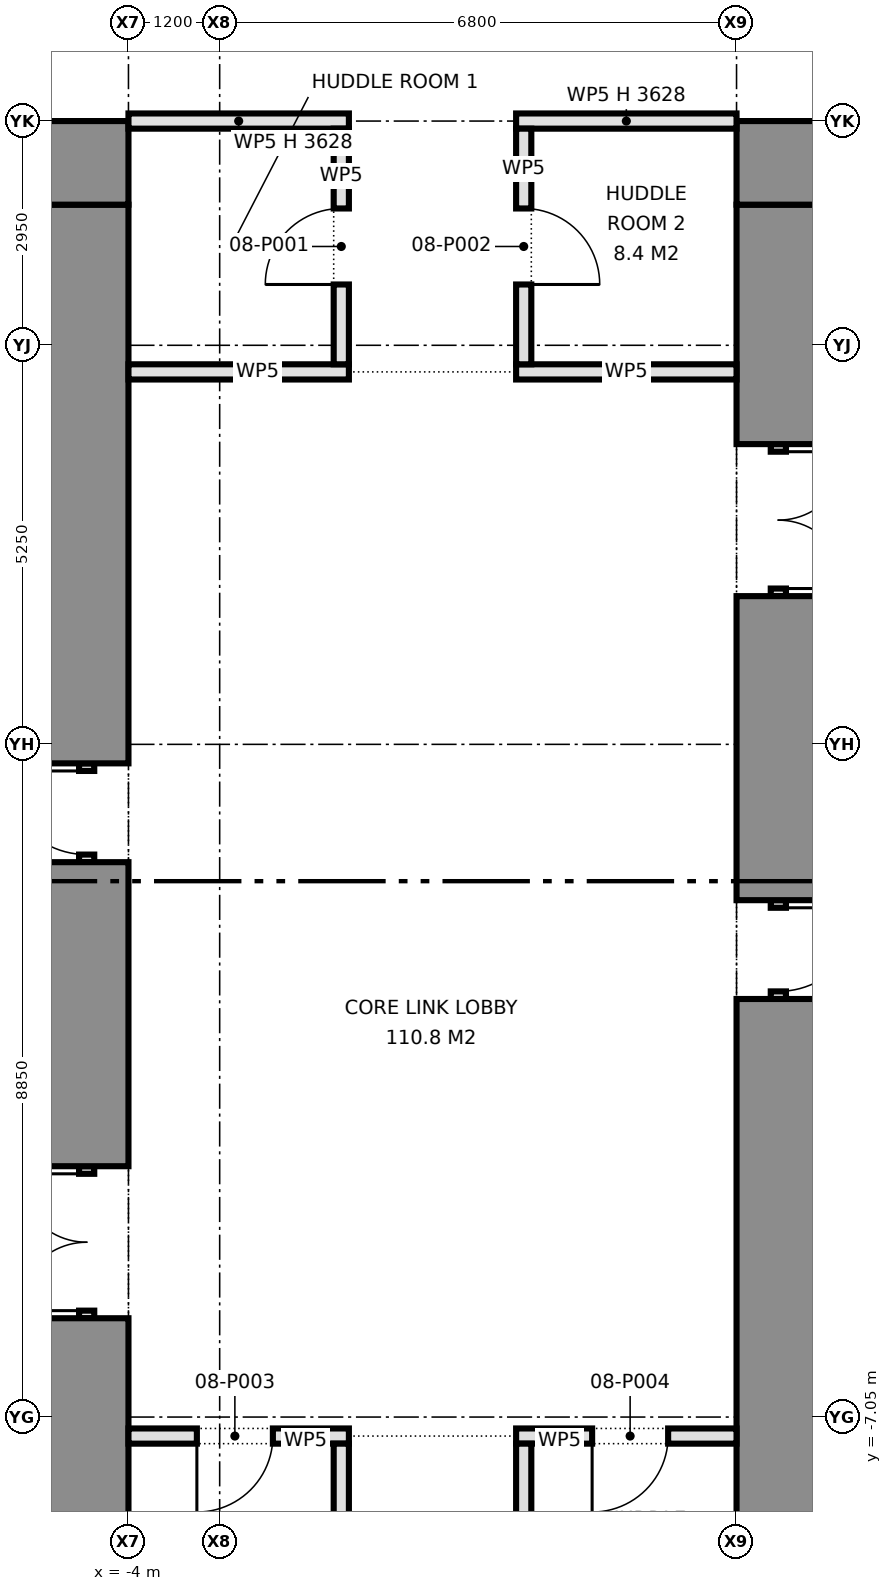
"""IFC4 building model, lengths in metres.
Left out: names, types, materials, properties, quantities, classifications, styles, units other than length and angle.
Written with IfcOpenShell. Run it as: python <this file> out.ifc"""

import sys

from ifc_helpers import new_model, si_unit, direction, frame, frame_2d, origin, place, context, subcontext, project, spatial, rectangle, extrude, element, fill, save


model = new_model("IFC4")
c1 = context("Model", 3, precision=1e-05, world=origin(), true_north=direction((0.0, 1.0)))
c2 = subcontext(c1, "Body", "Model", "MODEL_VIEW")
j1 = project(units=[si_unit("LENGTHUNIT", "METRE"), si_unit("PLANEANGLEUNIT", "RADIAN")], contexts=[c1])
p1 = place(None, origin())
s1 = spatial("IfcSite", under=j1, at=p1, CompositionType="ELEMENT")
p2 = place(p1, origin())
s2 = spatial("IfcBuilding", under=s1, at=p2, CompositionType="ELEMENT")
p3 = place(p2, frame((0.0, 0.0, 35.3)))
s3 = spatial("IfcBuildingStorey", under=s2, at=p3, CompositionType="ELEMENT", Elevation=35.3)
p4 = place(p3, frame((-15.0, 9.45, 0.0), z_axis=(0.0, 0.0, 1.0), x_axis=(1.0, 0.0, 0.0)))
e1 = element("IfcWall", 1, at=p4, inside=s3, PredefinedType="SHEAR", context=c2, shape_type="SweptSolid", body=[
    extrude(rectangle(XDim=11.0, YDim=1.1, at=frame_2d((5.5, 0.0))), origin(), (0.0, 0.0, 1.0), 4.575),
])
p5 = place(p3, frame((-4.55, -8.9, 0.0), z_axis=(0.0, 0.0, 1.0), x_axis=(0.0, 1.0, 0.0)))
e2 = element("IfcWall", 2, at=p5, inside=s3, PredefinedType="SHEAR", context=c2, shape_type="SweptSolid", body=[
    extrude(rectangle(XDim=3.15, YDim=1.1, at=frame_2d((1.575, 0.0))), origin(), (0.0, 0.0, 1.0), 4.575),
])
p6 = place(p3, frame((-4.55, -5.75, 0.0), z_axis=(0.0, 0.0, 1.0), x_axis=(0.0, 1.0, 0.0)))
e3 = element("IfcWall", 3, at=p6, inside=s3, PredefinedType="PARTITIONING", context=c2, shape_type="SweptSolid", body=[
    extrude(rectangle(XDim=2.0, YDim=0.2, at=frame_2d((1.0, 0.0))), origin(), (0.0, 0.0, 1.0), 2.4),
])
p7 = place(p6, frame((0.1, 0.0, 0.0)))
e4 = element("IfcOpeningElement", 4, at=p7, cuts=e3, PredefinedType="OPENING", context=c2, shape_type="SweptSolid", body=[
    extrude(rectangle(XDim=1.8, YDim=2.1, at=frame_2d((0.9, 1.05))), frame((0.0, 0.11, 0.0), z_axis=(0.0, -1.0, 0.0), x_axis=(1.0, 0.0, 0.0)), (0.0, 0.0, 1.0), 0.22),
])
p8 = place(p3, frame((-4.55, -3.75, 0.0), z_axis=(0.0, 0.0, 1.0), x_axis=(0.0, 1.0, 0.0)))
e5 = element("IfcWall", 5, at=p8, inside=s3, PredefinedType="SHEAR", context=c2, shape_type="SweptSolid", body=[
    extrude(rectangle(XDim=4.0, YDim=1.1, at=frame_2d((2.0, 0.0))), origin(), (0.0, 0.0, 1.0), 4.575),
])
p9 = place(p3, frame((-4.55, 0.25, 0.0), z_axis=(0.0, 0.0, 1.0), x_axis=(0.0, 1.0, 0.0)))
e6 = element("IfcWall", 6, at=p9, inside=s3, PredefinedType="PARTITIONING", context=c2, shape_type="SweptSolid", body=[
    extrude(rectangle(XDim=1.3, YDim=0.2, at=frame_2d((0.65, 0.0))), origin(), (0.0, 0.0, 1.0), 2.4),
])
p10 = place(p9, frame((0.1, 0.0, 0.0)))
e7 = element("IfcOpeningElement", 7, at=p10, cuts=e6, PredefinedType="OPENING", context=c2, shape_type="SweptSolid", body=[
    extrude(rectangle(XDim=1.1, YDim=2.1, at=frame_2d((0.55, 1.05))), frame((0.0, 0.11, 0.0), z_axis=(0.0, -1.0, 0.0), x_axis=(1.0, 0.0, 0.0)), (0.0, 0.0, 1.0), 0.22),
])
p11 = place(p3, frame((-4.55, 1.55, 0.0), z_axis=(0.0, 0.0, 1.0), x_axis=(0.0, 1.0, 0.0)))
e8 = element("IfcWall", 8, at=p11, inside=s3, PredefinedType="SHEAR", context=c2, shape_type="SweptSolid", body=[
    extrude(rectangle(XDim=7.35, YDim=1.1, at=frame_2d((3.675, 0.0))), origin(), (0.0, 0.0, 1.0), 4.575),
])
p12 = place(p3, frame((15.0, 9.45, 0.0), z_axis=(0.0, 0.0, 1.0), x_axis=(-1.0, 0.0, 0.0)))
e9 = element("IfcWall", 9, at=p12, inside=s3, PredefinedType="SHEAR", context=c2, shape_type="SweptSolid", body=[
    extrude(rectangle(XDim=11.0, YDim=1.1, at=frame_2d((5.5, 0.0))), origin(), (0.0, 0.0, 1.0), 4.575),
])
p13 = place(p3, frame((4.55, 8.9, 0.0), z_axis=(0.0, 0.0, 1.0), x_axis=(0.0, -1.0, 0.0)))
e10 = element("IfcWall", 10, at=p13, inside=s3, PredefinedType="SHEAR", context=c2, shape_type="SweptSolid", body=[
    extrude(rectangle(XDim=3.15, YDim=1.1, at=frame_2d((1.575, 0.0))), origin(), (0.0, 0.0, 1.0), 4.575),
])
p14 = place(p3, frame((4.55, 5.75, 0.0), z_axis=(0.0, 0.0, 1.0), x_axis=(0.0, -1.0, 0.0)))
e11 = element("IfcWall", 11, at=p14, inside=s3, PredefinedType="PARTITIONING", context=c2, shape_type="SweptSolid", body=[
    extrude(rectangle(XDim=2.0, YDim=0.2, at=frame_2d((1.0, 0.0))), origin(), (0.0, 0.0, 1.0), 2.4),
])
p15 = place(p14, frame((0.1, 0.0, 0.0)))
e12 = element("IfcOpeningElement", 12, at=p15, cuts=e11, PredefinedType="OPENING", context=c2, shape_type="SweptSolid", body=[
    extrude(rectangle(XDim=1.8, YDim=2.1, at=frame_2d((0.9, 1.05))), frame((0.0, 0.11, 0.0), z_axis=(0.0, -1.0, 0.0), x_axis=(1.0, 0.0, 0.0)), (0.0, 0.0, 1.0), 0.22),
])
p16 = place(p3, frame((4.55, 3.75, 0.0), z_axis=(0.0, 0.0, 1.0), x_axis=(0.0, -1.0, 0.0)))
e13 = element("IfcWall", 13, at=p16, inside=s3, PredefinedType="SHEAR", context=c2, shape_type="SweptSolid", body=[
    extrude(rectangle(XDim=4.0, YDim=1.1, at=frame_2d((2.0, 0.0))), origin(), (0.0, 0.0, 1.0), 4.575),
])
p17 = place(p3, frame((4.55, -0.25, 0.0), z_axis=(0.0, 0.0, 1.0), x_axis=(0.0, -1.0, 0.0)))
e14 = element("IfcWall", 14, at=p17, inside=s3, PredefinedType="PARTITIONING", context=c2, shape_type="SweptSolid", body=[
    extrude(rectangle(XDim=1.3, YDim=0.2, at=frame_2d((0.65, 0.0))), origin(), (0.0, 0.0, 1.0), 2.4),
])
p18 = place(p17, frame((0.1, 0.0, 0.0)))
e15 = element("IfcOpeningElement", 15, at=p18, cuts=e14, PredefinedType="OPENING", context=c2, shape_type="SweptSolid", body=[
    extrude(rectangle(XDim=1.1, YDim=2.1, at=frame_2d((0.55, 1.05))), frame((0.0, 0.11, 0.0), z_axis=(0.0, -1.0, 0.0), x_axis=(1.0, 0.0, 0.0)), (0.0, 0.0, 1.0), 0.22),
])
p19 = place(p3, frame((4.55, -1.55, 0.0), z_axis=(0.0, 0.0, 1.0), x_axis=(0.0, -1.0, 0.0)))
e16 = element("IfcWall", 16, at=p19, inside=s3, PredefinedType="SHEAR", context=c2, shape_type="SweptSolid", body=[
    extrude(rectangle(XDim=7.35, YDim=1.1, at=frame_2d((3.675, 0.0))), origin(), (0.0, 0.0, 1.0), 4.575),
])
p20 = place(p3, frame((-4.0, -7.3, 0.0), z_axis=(0.0, 0.0, 1.0), x_axis=(1.0, 0.0, 0.0)))
e17 = element("IfcWall", 17, at=p20, inside=s3, PredefinedType="PARTITIONING", context=c2, shape_type="SweptSolid", body=[
    extrude(rectangle(XDim=2.9, YDim=0.2, at=frame_2d((1.45, 0.0))), origin(), (0.0, 0.0, 1.0), 4.575),
])
p21 = place(p20, frame((0.9, 0.0, 0.0)))
e18 = element("IfcOpeningElement", 18, at=p21, cuts=e17, PredefinedType="OPENING", context=c2, shape_type="SweptSolid", body=[
    extrude(rectangle(XDim=1.0, YDim=2.1, at=frame_2d((0.5, 1.05))), frame((0.0, 0.11, 0.0), z_axis=(0.0, -1.0, 0.0), x_axis=(1.0, 0.0, 0.0)), (0.0, 0.0, 1.0), 0.22),
])
p22 = place(p3, frame((1.1, -7.3, 0.0), z_axis=(0.0, 0.0, 1.0), x_axis=(1.0, 0.0, 0.0)))
e19 = element("IfcWall", 19, at=p22, inside=s3, PredefinedType="PARTITIONING", context=c2, shape_type="SweptSolid", body=[
    extrude(rectangle(XDim=2.9, YDim=0.2, at=frame_2d((1.45, 0.0))), origin(), (0.0, 0.0, 1.0), 4.575),
])
p23 = place(p22, frame((1.0, 0.0, 0.0)))
e20 = element("IfcOpeningElement", 20, at=p23, cuts=e19, PredefinedType="OPENING", context=c2, shape_type="SweptSolid", body=[
    extrude(rectangle(XDim=1.0, YDim=2.1, at=frame_2d((0.5, 1.05))), frame((0.0, 0.11, 0.0), z_axis=(0.0, -1.0, 0.0), x_axis=(1.0, 0.0, 0.0)), (0.0, 0.0, 1.0), 0.22),
])
for number, where, z_axis, x_axis in (
    (21, (-4.0, 6.7, 0.0), (0.0, 0.0, 1.0), (1.0, 0.0, 0.0)),
    (22, (1.1, 6.7, 0.0), (0.0, 0.0, 1.0), (1.0, 0.0, 0.0)),
):
    element("IfcWall", number, at=place(p3, frame(where, z_axis=z_axis, x_axis=x_axis)), inside=s3, PredefinedType="PARTITIONING", context=c2, shape_type="SweptSolid", body=[
        extrude(rectangle(XDim=2.9, YDim=0.2, at=frame_2d((1.45, 0.0))), origin(), (0.0, 0.0, 1.0), 4.575),
    ])
for number, where, z_axis, x_axis in (
    (23, (-4.0, 10.0, 0.0), (0.0, 0.0, 1.0), (1.0, 0.0, 0.0)),
    (24, (1.1, 10.0, 0.0), (0.0, 0.0, 1.0), (1.0, 0.0, 0.0)),
):
    element("IfcWall", number, at=place(p3, frame(where, z_axis=z_axis, x_axis=x_axis)), inside=s3, PredefinedType="PARTITIONING", context=c2, shape_type="SweptSolid", body=[
        extrude(rectangle(XDim=2.9, YDim=0.2, at=frame_2d((1.45, 0.0))), origin(), (0.0, 0.0, 1.0), 3.627),
    ])
p24 = place(p3, frame((1.2, -9.9, 0.0), z_axis=(0.0, 0.0, 1.0), x_axis=(0.0, 1.0, 0.0)))
e25 = element("IfcWall", 25, at=p24, inside=s3, PredefinedType="PARTITIONING", context=c2, shape_type="SweptSolid", body=[
    extrude(rectangle(XDim=2.5, YDim=0.2, at=frame_2d((1.25, 0.0))), origin(), (0.0, 0.0, 1.0), 4.575),
])
p25 = place(p3, frame((1.2, 6.8, 0.0), z_axis=(0.0, 0.0, 1.0), x_axis=(0.0, 1.0, 0.0)))
e26 = element("IfcWall", 26, at=p25, inside=s3, PredefinedType="PARTITIONING", context=c2, shape_type="SweptSolid", body=[
    extrude(rectangle(XDim=3.1, YDim=0.2, at=frame_2d((1.55, 0.0))), origin(), (0.0, 0.0, 1.0), 4.575),
])
p26 = place(p25, frame((1.05, 0.0, 0.0)))
e27 = element("IfcOpeningElement", 27, at=p26, cuts=e26, PredefinedType="OPENING", context=c2, shape_type="SweptSolid", body=[
    extrude(rectangle(XDim=1.0, YDim=2.1, at=frame_2d((0.5, 1.05))), frame((0.0, 0.11, 0.0), z_axis=(0.0, -1.0, 0.0), x_axis=(1.0, 0.0, 0.0)), (0.0, 0.0, 1.0), 0.22),
])
p27 = place(p3, frame((-1.2, -9.9, 0.0), z_axis=(0.0, 0.0, 1.0), x_axis=(0.0, 1.0, 0.0)))
e28 = element("IfcWall", 28, at=p27, inside=s3, PredefinedType="PARTITIONING", context=c2, shape_type="SweptSolid", body=[
    extrude(rectangle(XDim=2.5, YDim=0.2, at=frame_2d((1.25, 0.0))), origin(), (0.0, 0.0, 1.0), 4.575),
])
p28 = place(p3, frame((-1.2, 6.8, 0.0), z_axis=(0.0, 0.0, 1.0), x_axis=(0.0, 1.0, 0.0)))
e29 = element("IfcWall", 29, at=p28, inside=s3, PredefinedType="PARTITIONING", context=c2, shape_type="SweptSolid", body=[
    extrude(rectangle(XDim=3.1, YDim=0.2, at=frame_2d((1.55, 0.0))), origin(), (0.0, 0.0, 1.0), 4.575),
])
p29 = place(p28, frame((1.05, 0.0, 0.0)))
e30 = element("IfcOpeningElement", 30, at=p29, cuts=e29, PredefinedType="OPENING", context=c2, shape_type="SweptSolid", body=[
    extrude(rectangle(XDim=1.0, YDim=2.1, at=frame_2d((0.5, 1.05))), frame((0.0, 0.11, 0.0), z_axis=(0.0, -1.0, 0.0), x_axis=(1.0, 0.0, 0.0)), (0.0, 0.0, 1.0), 0.22),
])
p30 = place(p7, origin())
e31 = element("IfcDoor", 31, at=p30, inside=s3, OperationType="DOUBLE_DOOR_SINGLE_SWING", PredefinedType="DOOR", context=c2, shape_type="SweptSolid", body=[
    extrude(rectangle(XDim=1.8, YDim=2.1, at=frame_2d((0.9, 1.05))), frame((0.0, 0.025, 0.0), z_axis=(0.0, -1.0, 0.0), x_axis=(1.0, 0.0, 0.0)), (0.0, 0.0, 1.0), 0.05),
])
fill(e4, e31)
p31 = place(p10, origin())
e32 = element("IfcDoor", 32, at=p31, inside=s3, OperationType="SINGLE_SWING_RIGHT", PredefinedType="DOOR", context=c2, shape_type="SweptSolid", body=[
    extrude(rectangle(XDim=1.1, YDim=2.1, at=frame_2d((0.55, 1.05))), frame((0.0, 0.025, 0.0), z_axis=(0.0, -1.0, 0.0), x_axis=(1.0, 0.0, 0.0)), (0.0, 0.0, 1.0), 0.05),
])
fill(e7, e32)
p32 = place(p15, origin())
e33 = element("IfcDoor", 33, at=p32, inside=s3, OperationType="DOUBLE_DOOR_SINGLE_SWING", PredefinedType="DOOR", context=c2, shape_type="SweptSolid", body=[
    extrude(rectangle(XDim=1.8, YDim=2.1, at=frame_2d((0.9, 1.05))), frame((0.0, 0.025, 0.0), z_axis=(0.0, -1.0, 0.0), x_axis=(1.0, 0.0, 0.0)), (0.0, 0.0, 1.0), 0.05),
])
fill(e12, e33)
p33 = place(p18, origin())
e34 = element("IfcDoor", 34, at=p33, inside=s3, OperationType="SINGLE_SWING_LEFT", PredefinedType="DOOR", context=c2, shape_type="SweptSolid", body=[
    extrude(rectangle(XDim=1.1, YDim=2.1, at=frame_2d((0.55, 1.05))), frame((0.0, 0.025, 0.0), z_axis=(0.0, -1.0, 0.0), x_axis=(1.0, 0.0, 0.0)), (0.0, 0.0, 1.0), 0.05),
])
fill(e15, e34)
p34 = place(p29, origin())
e35 = element("IfcDoor", 35, at=p34, inside=s3, OperationType="SINGLE_SWING_LEFT", PredefinedType="DOOR", context=c2, shape_type="SweptSolid", body=[
    extrude(rectangle(XDim=1.0, YDim=2.1, at=frame_2d((0.5, 1.05))), frame((0.0, 0.025, 0.0), z_axis=(0.0, -1.0, 0.0), x_axis=(1.0, 0.0, 0.0)), (0.0, 0.0, 1.0), 0.05),
])
fill(e30, e35)
p35 = place(p26, frame((1.0, 0.0, 0.0), z_axis=(0.0, 0.0, 1.0), x_axis=(-1.0, 0.0, 0.0)))
e36 = element("IfcDoor", 36, at=p35, inside=s3, OperationType="SINGLE_SWING_RIGHT", PredefinedType="DOOR", context=c2, shape_type="SweptSolid", body=[
    extrude(rectangle(XDim=1.0, YDim=2.1, at=frame_2d((0.5, 1.05))), frame((0.0, 0.025, 0.0), z_axis=(0.0, -1.0, 0.0), x_axis=(1.0, 0.0, 0.0)), (0.0, 0.0, 1.0), 0.05),
])
fill(e27, e36)
p36 = place(p21, frame((1.0, 0.0, 0.0), z_axis=(0.0, 0.0, 1.0), x_axis=(-1.0, 0.0, 0.0)))
e37 = element("IfcDoor", 37, at=p36, inside=s3, OperationType="SINGLE_SWING_RIGHT", PredefinedType="DOOR", context=c2, shape_type="SweptSolid", body=[
    extrude(rectangle(XDim=1.0, YDim=2.1, at=frame_2d((0.5, 1.05))), frame((0.0, 0.025, 0.0), z_axis=(0.0, -1.0, 0.0), x_axis=(1.0, 0.0, 0.0)), (0.0, 0.0, 1.0), 0.05),
])
fill(e18, e37)
p37 = place(p23, frame((1.0, 0.0, 0.0), z_axis=(0.0, 0.0, 1.0), x_axis=(-1.0, 0.0, 0.0)))
e38 = element("IfcDoor", 38, at=p37, inside=s3, OperationType="SINGLE_SWING_RIGHT", PredefinedType="DOOR", context=c2, shape_type="SweptSolid", body=[
    extrude(rectangle(XDim=1.0, YDim=2.1, at=frame_2d((0.5, 1.05))), frame((0.0, 0.025, 0.0), z_axis=(0.0, -1.0, 0.0), x_axis=(1.0, 0.0, 0.0)), (0.0, 0.0, 1.0), 0.05),
])
fill(e20, e38)
save(model, sys.argv[1])
